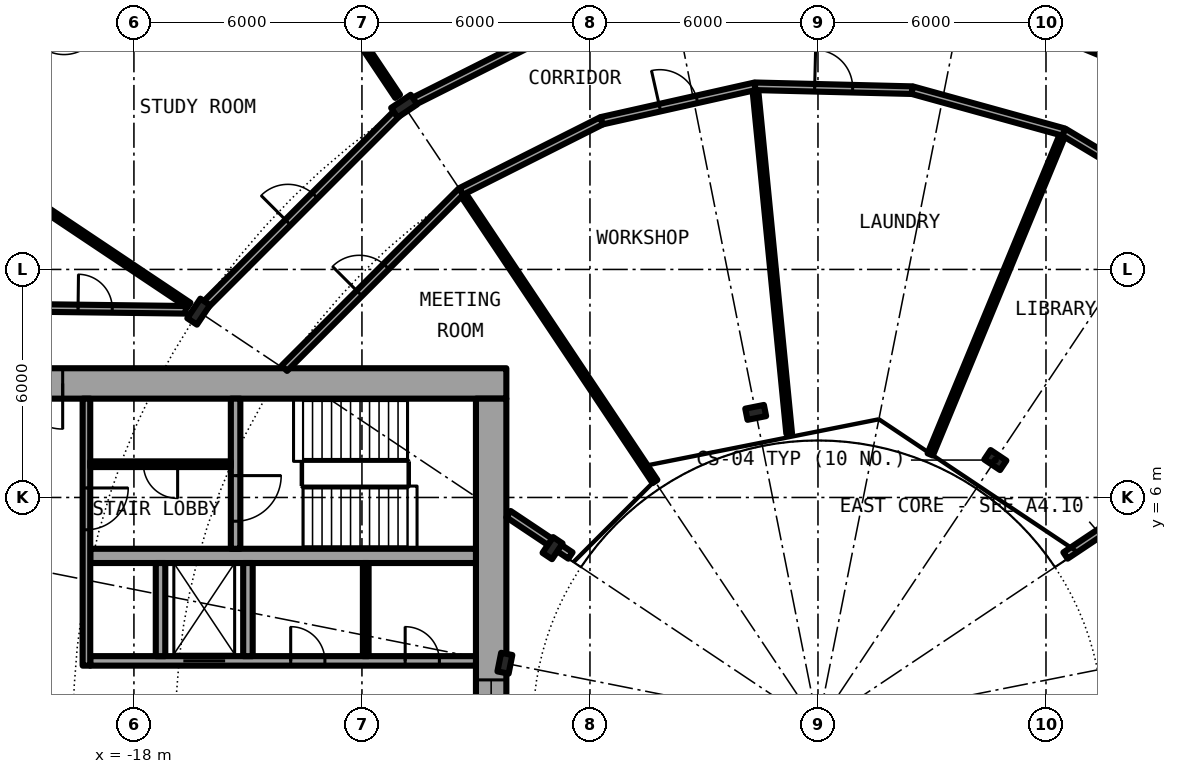
"""IFC4 building model, lengths in metres.
Left out: names, types, materials, properties, quantities, classifications, styles, units other than length and angle.
Written with IfcOpenShell. Run it as: python <this file> out.ifc"""

import sys

from ifc_helpers import new_model, si_unit, direction, frame, frame_2d, origin, origin_2d, place, context, subcontext, project, spatial, rectangle, i_section, extrude, element, fill, save


model = new_model("IFC4")
c1 = context("Model", 3, precision=1e-05, world=origin(), true_north=direction((0.0, 1.0)))
c2 = subcontext(c1, "Body", "Model", "MODEL_VIEW")
j1 = project(units=[si_unit("LENGTHUNIT", "METRE"), si_unit("PLANEANGLEUNIT", "RADIAN")], contexts=[c1])
p1 = place(None, origin())
s1 = spatial("IfcSite", under=j1, at=p1, CompositionType="ELEMENT")
p2 = place(p1, origin())
s2 = spatial("IfcBuilding", under=s1, at=p2, CompositionType="ELEMENT")
p3 = place(p2, frame((0.0, 0.0, 53.3)))
s3 = spatial("IfcBuildingStorey", under=s2, at=p3, CompositionType="ELEMENT", Elevation=53.3)
for number, where, z_axis, x_axis in (
    (1, (-10.889, 16.297, 0.0), (0.0, 0.0, 1.0), (-0.556, 0.831, 0.0)),
    (2, (-16.297, 10.889, 0.0), (0.0, 0.0, 1.0), (-0.831, 0.556, 0.0)),
):
    element("IfcColumn", number, at=place(p3, frame(where, z_axis=z_axis, x_axis=x_axis)), inside=s3, PredefinedType="COLUMN", context=c2, shape_type="SweptSolid", body=[
        extrude(i_section(OverallWidth=0.305, OverallDepth=0.62, WebThickness=0.021, FlangeThickness=0.04, FilletRadius=0.027, at=origin_2d()), origin(), (0.0, 0.0, 1.0), 4.2),
    ])
for number, where, z_axis, x_axis in (
    (3, (4.667, 6.984, 0.0), (0.0, 0.0, 1.0), (0.556, 0.831, 0.0)),
    (4, (-1.639, 8.239, 0.0), (0.0, 0.0, 1.0), (-0.195, 0.981, 0.0)),
    (5, (-6.984, 4.667, 0.0), (0.0, 0.0, 1.0), (-0.831, 0.556, 0.0)),
    (6, (-8.239, 1.639, 0.0), (0.0, 0.0, 1.0), (-0.981, 0.195, 0.0)),
):
    element("IfcColumn", number, at=place(p3, frame(where, z_axis=z_axis, x_axis=x_axis)), inside=s3, PredefinedType="COLUMN", context=c2, shape_type="SweptSolid", body=[
        extrude(i_section(OverallWidth=0.3, OverallDepth=0.5, WebThickness=0.014, FlangeThickness=0.028, FilletRadius=0.027, at=origin_2d()), origin(), (0.0, 0.0, 1.0), 4.2),
    ])
p4 = place(p3, frame((-19.304, 19.304, 0.0), z_axis=(0.0, 0.0, 1.0), x_axis=(-0.634382322723, -0.773019449054, 0.0)))
e7 = element("IfcWall", 7, at=p4, inside=s3, PredefinedType="SOLIDWALL", context=c2, shape_type="SweptSolid", body=[
    extrude(rectangle(XDim=5.352, YDim=0.25, at=frame_2d((2.676, 0.0))), origin(), (0.0, 0.0, 1.0), 3.8),
])
p5 = place(p4, frame((0.841, 0.0, 0.0)))
e8 = element("IfcOpeningElement", 8, at=p5, cuts=e7, PredefinedType="OPENING", context=c2, shape_type="SweptSolid", body=[
    extrude(rectangle(XDim=1.0, YDim=2.2, at=frame_2d((0.5, 1.1))), frame((0.0, 0.135, 0.0), z_axis=(0.0, -1.0, 0.0), x_axis=(1.0, 0.0, 0.0)), (0.0, 0.0, 1.0), 0.27),
])
p6 = place(p4, frame((3.51, 0.0, 0.0)))
e9 = element("IfcOpeningElement", 9, at=p6, cuts=e7, PredefinedType="OPENING", context=c2, shape_type="SweptSolid", body=[
    extrude(rectangle(XDim=1.0, YDim=2.2, at=frame_2d((0.5, 1.1))), frame((0.0, 0.135, 0.0), z_axis=(0.0, -1.0, 0.0), x_axis=(1.0, 0.0, 0.0)), (0.0, 0.0, 1.0), 0.27),
])
p7 = place(p3, frame((-8.2, 9.0, 0.0), z_axis=(0.0, 0.0, 1.0), x_axis=(-1.0, 0.0, 0.0)))
e10 = element("IfcWall", 10, at=p7, inside=s3, PredefinedType="SHEAR", context=c2, shape_type="SweptSolid", body=[
    extrude(rectangle(XDim=14.2, YDim=0.8, at=frame_2d((7.1, 0.0))), origin(), (0.0, 0.0, 1.0), 4.2),
])
p8 = place(p7, frame((11.675, 0.0, 0.0)))
e11 = element("IfcOpeningElement", 11, at=p8, cuts=e10, PredefinedType="OPENING", context=c2, shape_type="SweptSolid", body=[
    extrude(rectangle(XDim=1.2, YDim=2.3, at=frame_2d((0.6, 1.15))), frame((0.0, 0.41, 0.0), z_axis=(0.0, -1.0, 0.0), x_axis=(1.0, 0.0, 0.0)), (0.0, 0.0, 1.0), 0.82),
])
p9 = place(p3, frame((-8.6, 8.6, 0.0), z_axis=(0.0, 0.0, 1.0), x_axis=(0.0, -1.0, 0.0)))
e12 = element("IfcWall", 12, at=p9, inside=s3, PredefinedType="SHEAR", context=c2, shape_type="SweptSolid", body=[
    extrude(rectangle(XDim=17.2, YDim=0.8, at=frame_2d((8.6, 0.0))), origin(), (0.0, 0.0, 1.0), 4.2),
])
p10 = place(p9, frame((7.4, 0.0, 0.1)))
e13 = element("IfcOpeningElement", 13, at=p10, cuts=e12, PredefinedType="OPENING", context=c2, shape_type="SweptSolid", body=[
    extrude(rectangle(XDim=2.4, YDim=2.2, at=frame_2d((1.2, 1.1))), frame((0.0, 0.41, 0.0), z_axis=(0.0, -1.0, 0.0), x_axis=(1.0, 0.0, 0.0)), (0.0, 0.0, 1.0), 0.82),
])
p11 = place(p3, frame((-19.15, 1.7, 0.0), z_axis=(0.0, 0.0, 1.0), x_axis=(1.0, 0.0, 0.0)))
e14 = element("IfcWall", 14, at=p11, inside=s3, PredefinedType="SHEAR", context=c2, shape_type="SweptSolid", body=[
    extrude(rectangle(XDim=10.15, YDim=0.25, at=frame_2d((5.075, 0.0))), origin(), (0.0, 0.0, 1.0), 4.2),
])
p12 = place(p11, frame((2.45, 0.0, 0.0)))
e15 = element("IfcOpeningElement", 15, at=p12, cuts=e14, PredefinedType="OPENING", context=c2, shape_type="SweptSolid", body=[
    extrude(rectangle(XDim=1.1, YDim=2.3, at=frame_2d((0.55, 1.15))), frame((0.0, 0.135, 0.0), z_axis=(0.0, -1.0, 0.0), x_axis=(1.0, 0.0, 0.0)), (0.0, 0.0, 1.0), 0.27),
])
p13 = place(p11, frame((8.288, 0.0, 0.0)))
e16 = element("IfcOpeningElement", 16, at=p13, cuts=e14, PredefinedType="OPENING", context=c2, shape_type="SweptSolid", body=[
    extrude(rectangle(XDim=0.9, YDim=2.3, at=frame_2d((0.45, 1.15))), frame((0.0, 0.135, 0.0), z_axis=(0.0, -1.0, 0.0), x_axis=(1.0, 0.0, 0.0)), (0.0, 0.0, 1.0), 0.27),
])
p14 = place(p11, frame((5.275, 0.0, 0.0)))
e17 = element("IfcOpeningElement", 17, at=p14, cuts=e14, PredefinedType="OPENING", context=c2, shape_type="SweptSolid", body=[
    extrude(rectangle(XDim=0.9, YDim=2.3, at=frame_2d((0.45, 1.15))), frame((0.0, 0.135, 0.0), z_axis=(0.0, -1.0, 0.0), x_axis=(1.0, 0.0, 0.0)), (0.0, 0.0, 1.0), 0.27),
])
p15 = place(p3, frame((-9.0, 4.462, 0.0), z_axis=(0.0, 0.0, 1.0), x_axis=(-1.0, 0.0, 0.0)))
e18 = element("IfcWall", 18, at=p15, inside=s3, PredefinedType="SHEAR", context=c2, shape_type="SweptSolid", body=[
    extrude(rectangle(XDim=10.15, YDim=0.375, at=frame_2d((5.075, 0.0))), origin(), (0.0, 0.0, 1.0), 4.2),
])
p16 = place(p3, frame((-15.325, 8.6, 0.0), z_axis=(0.0, 0.0, 1.0), x_axis=(0.0, -1.0, 0.0)))
e19 = element("IfcWall", 19, at=p16, inside=s3, PredefinedType="SHEAR", context=c2, shape_type="SweptSolid", body=[
    extrude(rectangle(XDim=3.95, YDim=0.25, at=frame_2d((1.975, 0.0))), origin(), (0.0, 0.0, 1.0), 4.2),
])
p17 = place(p16, frame((2.025, 0.0, 0.0)))
e20 = element("IfcOpeningElement", 20, at=p17, cuts=e19, PredefinedType="OPENING", context=c2, shape_type="SweptSolid", body=[
    extrude(rectangle(XDim=1.2, YDim=2.3, at=frame_2d((0.6, 1.15))), frame((0.0, 0.135, 0.0), z_axis=(0.0, -1.0, 0.0), x_axis=(1.0, 0.0, 0.0)), (0.0, 0.0, 1.0), 0.27),
])
for number, where, z_axis, x_axis in (
    (21, (-15.0, 1.825, 0.0), (0.0, 0.0, 1.0), (0.0, 1.0, 0.0)),
    (22, (-17.3, 1.825, 0.0), (0.0, 0.0, 1.0), (0.0, 1.0, 0.0)),
):
    element("IfcWall", number, at=place(p3, frame(where, z_axis=z_axis, x_axis=x_axis)), inside=s3, PredefinedType="SOLIDWALL", context=c2, shape_type="SweptSolid", body=[
        extrude(rectangle(XDim=2.45, YDim=0.25, at=frame_2d((1.225, 0.0))), origin(), (0.0, 0.0, 1.0), 3.8),
    ])
p18 = place(p3, frame((-19.25, 8.6, 0.0), z_axis=(0.0, 0.0, 1.0), x_axis=(0.0, -1.0, 0.0)))
e23 = element("IfcWall", 23, at=p18, inside=s3, PredefinedType="SOLIDWALL", context=c2, shape_type="SweptSolid", body=[
    extrude(rectangle(XDim=7.025, YDim=0.2, at=frame_2d((3.513, 0.0))), origin(), (0.0, 0.0, 1.0), 3.8),
])
p19 = place(p18, frame((2.35, 0.0, 0.0)))
e24 = element("IfcOpeningElement", 24, at=p19, cuts=e23, PredefinedType="OPENING", context=c2, shape_type="SweptSolid", body=[
    extrude(rectangle(XDim=1.1, YDim=2.3, at=frame_2d((0.55, 1.15))), frame((0.0, 0.11, 0.0), z_axis=(0.0, -1.0, 0.0), x_axis=(1.0, 0.0, 0.0)), (0.0, 0.0, 1.0), 0.22),
])
p20 = place(p3, frame((-11.9, 1.825, 0.0), z_axis=(0.0, 0.0, 1.0), x_axis=(0.0, 1.0, 0.0)))
e25 = element("IfcWall", 25, at=p20, inside=s3, PredefinedType="PARTITIONING", context=c2, shape_type="SweptSolid", body=[
    extrude(rectangle(XDim=2.45, YDim=0.15, at=frame_2d((1.225, 0.0))), origin(), (0.0, 0.0, 1.0), 3.8),
])
p21 = place(p3, frame((-15.45, 6.875, 0.0), z_axis=(0.0, 0.0, 1.0), x_axis=(-1.0, 0.0, 0.0)))
e26 = element("IfcWall", 26, at=p21, inside=s3, PredefinedType="PARTITIONING", context=c2, shape_type="SweptSolid", body=[
    extrude(rectangle(XDim=3.7, YDim=0.15, at=frame_2d((1.85, 0.0))), origin(), (0.0, 0.0, 1.0), 3.8),
])
p22 = place(p21, frame((1.4, 0.0, 0.0)))
e27 = element("IfcOpeningElement", 27, at=p22, cuts=e26, PredefinedType="OPENING", context=c2, shape_type="SweptSolid", body=[
    extrude(rectangle(XDim=0.9, YDim=2.3, at=frame_2d((0.45, 1.15))), frame((0.0, 0.085, 0.0), z_axis=(0.0, -1.0, 0.0), x_axis=(1.0, 0.0, 0.0)), (0.0, 0.0, 1.0), 0.17),
])
p23 = place(p3, frame((-22.595, 15.098, 0.0), z_axis=(0.0, 0.0, 1.0), x_axis=(0.831403467378, -0.55566921314, 0.0)))
e28 = element("IfcWall", 28, at=p23, inside=s3, PredefinedType="PARTITIONING", context=c2, shape_type="SweptSolid", body=[
    extrude(rectangle(XDim=7.265, YDim=0.15, at=frame_2d((3.632, 0.0))), origin(), (0.0, 0.0, 1.0), 3.8),
])
p24 = place(p3, frame((-15.097, 22.595, 0.0), z_axis=(0.0, 0.0, 1.0), x_axis=(0.555576285599, -0.831465568067, 0.0)))
e29 = element("IfcWall", 29, at=p24, inside=s3, PredefinedType="PARTITIONING", context=c2, shape_type="SweptSolid", body=[
    extrude(rectangle(XDim=7.264, YDim=0.15, at=frame_2d((3.632, 0.0))), origin(), (0.0, 0.0, 1.0), 3.8),
])
p25 = place(p3, frame((-9.389, 14.052, 0.0), z_axis=(0.0, 0.0, 1.0), x_axis=(0.555540720778, -0.831489330994, 0.0)))
e30 = element("IfcWall", 30, at=p25, inside=s3, PredefinedType="PARTITIONING", context=c2, shape_type="SweptSolid", body=[
    extrude(rectangle(XDim=9.18, YDim=0.15, at=frame_2d((4.59, 0.0))), origin(), (0.0, 0.0, 1.0), 3.8),
])
p26 = place(p3, frame((-1.657, 16.819, 0.0), z_axis=(0.0, 0.0, 1.0), x_axis=(0.097921086551, -0.995194182463, 0.0)))
e31 = element("IfcWall", 31, at=p26, inside=s3, PredefinedType="PARTITIONING", context=c2, shape_type="SweptSolid", body=[
    extrude(rectangle(XDim=9.18, YDim=0.15, at=frame_2d((4.59, 0.0))), origin(), (0.0, 0.0, 1.0), 3.8),
])
p27 = place(p3, frame((2.954, 7.132, 0.0), z_axis=(0.0, 0.0, 1.0), x_axis=(0.382646942224, 0.923894646378, 0.0)))
e32 = element("IfcWall", 32, at=p27, inside=s3, PredefinedType="PARTITIONING", context=c2, shape_type="SweptSolid", body=[
    extrude(rectangle(XDim=9.181, YDim=0.15, at=frame_2d((4.59, 0.0))), origin(), (0.0, 0.0, 1.0), 3.8),
])
for number, where, z_axis, x_axis in (
    (33, (-6.513, 4.472, 0.0), (0.0, 0.0, 1.0), (-0.831, 0.556, 0.0)),
    (34, (6.513, 4.472, 0.0), (0.0, 0.0, 1.0), (0.831, 0.556, 0.0)),
):
    element("IfcWall", number, at=place(p3, frame(where, z_axis=z_axis, x_axis=x_axis)), inside=s3, PredefinedType="PARTITIONING", context=c2, shape_type="SweptSolid", body=[
        extrude(rectangle(XDim=1.962, YDim=0.2, at=frame_2d((0.981, 0.0))), origin(), (0.0, 0.0, 1.0), 3.8),
    ])
p28 = place(p3, frame((-21.675, 11.0, 0.0), z_axis=(0.0, 0.0, 1.0), x_axis=(0.99992425795, -0.012307654658, 0.0)))
e35 = element("IfcWall", 35, at=p28, inside=s3, PredefinedType="PARTITIONING", context=c2, shape_type="SweptSolid", body=[
    extrude(rectangle(XDim=5.039, YDim=0.2, at=frame_2d((2.519, 0.0))), origin(), (0.0, 0.0, 1.0), 3.8),
])
p29 = place(p28, frame((2.205, 0.0, 0.0)))
e36 = element("IfcOpeningElement", 36, at=p29, cuts=e35, PredefinedType="OPENING", context=c2, shape_type="SweptSolid", body=[
    extrude(rectangle(XDim=0.9, YDim=2.3, at=frame_2d((0.45, 1.15))), frame((0.0, 0.11, 0.0), z_axis=(0.0, -1.0, 0.0), x_axis=(1.0, 0.0, 0.0)), (0.0, 0.0, 1.0), 0.22),
])
p30 = place(p3, frame((-14.041, 9.4, 0.0), z_axis=(0.0, 0.0, 1.0), x_axis=(0.707106781187, 0.707106781187, 0.0)))
e37 = element("IfcWall", 37, at=p30, inside=s3, PredefinedType="PARTITIONING", context=c2, shape_type="SweptSolid", body=[
    extrude(rectangle(XDim=6.579, YDim=0.2, at=frame_2d((3.29, 0.0))), origin(), (0.0, 0.0, 1.0), 3.8),
])
p31 = place(p30, frame((2.789, 0.0, 0.0)))
e38 = element("IfcOpeningElement", 38, at=p31, cuts=e37, PredefinedType="OPENING", context=c2, shape_type="SweptSolid", body=[
    extrude(rectangle(XDim=1.0, YDim=2.3, at=frame_2d((0.5, 1.15))), frame((0.0, 0.11, 0.0), z_axis=(0.0, -1.0, 0.0), x_axis=(1.0, 0.0, 0.0)), (0.0, 0.0, 1.0), 0.22),
])
p32 = place(p3, frame((6.467, 15.614, 0.0), z_axis=(0.0, 0.0, 1.0), x_axis=(0.857696997328, -0.514155483074, 0.0)))
e39 = element("IfcWall", 39, at=p32, inside=s3, PredefinedType="PARTITIONING", context=c2, shape_type="SweptSolid", body=[
    extrude(rectangle(XDim=4.96, YDim=0.2, at=frame_2d((2.48, 0.0))), origin(), (0.0, 0.0, 1.0), 3.8),
])
p33 = place(p32, frame((1.98, 0.0, 0.0)))
e40 = element("IfcOpeningElement", 40, at=p33, cuts=e39, PredefinedType="OPENING", context=c2, shape_type="SweptSolid", body=[
    extrude(rectangle(XDim=1.0, YDim=2.3, at=frame_2d((0.5, 1.15))), frame((0.0, 0.11, 0.0), z_axis=(0.0, -1.0, 0.0), x_axis=(1.0, 0.0, 0.0)), (0.0, 0.0, 1.0), 0.22),
])
p34 = place(p3, frame((-9.389, 14.052, 0.0), z_axis=(0.0, 0.0, 1.0), x_axis=(0.893243942099, 0.449572307759, 0.0)))
e41 = element("IfcWall", 41, at=p34, inside=s3, PredefinedType="PARTITIONING", context=c2, shape_type="SweptSolid", body=[
    extrude(rectangle(XDim=4.137, YDim=0.2, at=frame_2d((2.069, 0.0))), origin(), (0.0, 0.0, 1.0), 3.8),
])
p35 = place(p3, frame((-5.693, 15.912, 0.0), z_axis=(0.0, 0.0, 1.0), x_axis=(0.975680467384, 0.219197686039, 0.0)))
e42 = element("IfcWall", 42, at=p35, inside=s3, PredefinedType="PARTITIONING", context=c2, shape_type="SweptSolid", body=[
    extrude(rectangle(XDim=4.138, YDim=0.2, at=frame_2d((2.069, 0.0))), origin(), (0.0, 0.0, 1.0), 3.8),
])
p36 = place(p35, frame((1.569, 0.0, 0.0)))
e43 = element("IfcOpeningElement", 43, at=p36, cuts=e42, PredefinedType="OPENING", context=c2, shape_type="SweptSolid", body=[
    extrude(rectangle(XDim=1.0, YDim=2.3, at=frame_2d((0.5, 1.15))), frame((0.0, 0.11, 0.0), z_axis=(0.0, -1.0, 0.0), x_axis=(1.0, 0.0, 0.0)), (0.0, 0.0, 1.0), 0.22),
])
p37 = place(p3, frame((-1.656, 16.819, 0.0), z_axis=(0.0, 0.0, 1.0), x_axis=(0.999695739034, -0.024666360836, 0.0)))
e44 = element("IfcWall", 44, at=p37, inside=s3, PredefinedType="PARTITIONING", context=c2, shape_type="SweptSolid", body=[
    extrude(rectangle(XDim=4.137, YDim=0.2, at=frame_2d((2.069, 0.0))), origin(), (0.0, 0.0, 1.0), 3.8),
])
p38 = place(p37, frame((1.569, 0.0, 0.0)))
e45 = element("IfcOpeningElement", 45, at=p38, cuts=e44, PredefinedType="OPENING", context=c2, shape_type="SweptSolid", body=[
    extrude(rectangle(XDim=1.0, YDim=2.3, at=frame_2d((0.5, 1.15))), frame((0.0, 0.11, 0.0), z_axis=(0.0, -1.0, 0.0), x_axis=(1.0, 0.0, 0.0)), (0.0, 0.0, 1.0), 0.22),
])
p39 = place(p3, frame((2.48, 16.717, 0.0), z_axis=(0.0, 0.0, 1.0), x_axis=(0.96379724587, -0.266636210694, 0.0)))
e46 = element("IfcWall", 46, at=p39, inside=s3, PredefinedType="PARTITIONING", context=c2, shape_type="SweptSolid", body=[
    extrude(rectangle(XDim=4.137, YDim=0.2, at=frame_2d((2.068, 0.0))), origin(), (0.0, 0.0, 1.0), 3.8),
])
p40 = place(p3, frame((-16.187, 10.999, 0.0), z_axis=(0.0, 0.0, 1.0), x_axis=(0.707106781187, 0.707106781187, 0.0)))
e47 = element("IfcWall", 47, at=p40, inside=s3, PredefinedType="PARTITIONING", context=c2, shape_type="SweptSolid", body=[
    extrude(rectangle(XDim=7.337, YDim=0.2, at=frame_2d((3.668, 0.0))), origin(), (0.0, 0.0, 1.0), 3.48),
])
p41 = place(p40, frame((3.168, 0.0, 0.0)))
e48 = element("IfcOpeningElement", 48, at=p41, cuts=e47, PredefinedType="OPENING", context=c2, shape_type="SweptSolid", body=[
    extrude(rectangle(XDim=1.0, YDim=2.3, at=frame_2d((0.5, 1.15))), frame((0.0, 0.11, 0.0), z_axis=(0.0, -1.0, 0.0), x_axis=(1.0, 0.0, 0.0)), (0.0, 0.0, 1.0), 0.22),
])
p42 = place(p3, frame((3.967, 19.164, 0.0), z_axis=(0.0, 0.0, 1.0), x_axis=(0.923873274019, -0.382698541353, 0.0)))
e49 = element("IfcWall", 49, at=p42, inside=s3, PredefinedType="PARTITIONING", context=c2, shape_type="SweptSolid", body=[
    extrude(rectangle(XDim=7.338, YDim=0.2, at=frame_2d((3.669, 0.0))), origin(), (0.0, 0.0, 1.0), 3.48),
])
p43 = place(p3, frame((-10.752, 16.366, 0.0), z_axis=(0.0, 0.0, 1.0), x_axis=(0.893246691773, 0.449566844459, 0.0)))
e50 = element("IfcWall", 50, at=p43, inside=s3, PredefinedType="PARTITIONING", context=c2, shape_type="SweptSolid", body=[
    extrude(rectangle(XDim=4.645, YDim=0.2, at=frame_2d((2.322, 0.0))), origin(), (0.0, 0.0, 1.0), 3.48),
])
p44 = place(p12, origin())
e51 = element("IfcDoor", 51, at=p44, inside=s3, OperationType="DOUBLE_DOOR_SLIDING", PredefinedType="DOOR", context=c2, shape_type="SweptSolid", body=[
    extrude(rectangle(XDim=1.1, YDim=2.3, at=frame_2d((0.55, 1.15))), frame((0.0, 0.025, 0.0), z_axis=(0.0, -1.0, 0.0), x_axis=(1.0, 0.0, 0.0)), (0.0, 0.0, 1.0), 0.05),
])
fill(e15, e51)
p45 = place(p13, origin())
e52 = element("IfcDoor", 52, at=p45, inside=s3, OperationType="SINGLE_SWING_LEFT", PredefinedType="DOOR", context=c2, shape_type="SweptSolid", body=[
    extrude(rectangle(XDim=0.9, YDim=2.3, at=frame_2d((0.45, 1.15))), frame((0.0, 0.025, 0.0), z_axis=(0.0, -1.0, 0.0), x_axis=(1.0, 0.0, 0.0)), (0.0, 0.0, 1.0), 0.05),
])
fill(e16, e52)
p46 = place(p14, origin())
e53 = element("IfcDoor", 53, at=p46, inside=s3, OperationType="SINGLE_SWING_LEFT", PredefinedType="DOOR", context=c2, shape_type="SweptSolid", body=[
    extrude(rectangle(XDim=0.9, YDim=2.3, at=frame_2d((0.45, 1.15))), frame((0.0, 0.025, 0.0), z_axis=(0.0, -1.0, 0.0), x_axis=(1.0, 0.0, 0.0)), (0.0, 0.0, 1.0), 0.05),
])
fill(e17, e53)
p47 = place(p22, origin())
e54 = element("IfcDoor", 54, at=p47, inside=s3, OperationType="SINGLE_SWING_LEFT", PredefinedType="DOOR", context=c2, shape_type="SweptSolid", body=[
    extrude(rectangle(XDim=0.9, YDim=2.3, at=frame_2d((0.45, 1.15))), frame((0.0, 0.025, 0.0), z_axis=(0.0, -1.0, 0.0), x_axis=(1.0, 0.0, 0.0)), (0.0, 0.0, 1.0), 0.05),
])
fill(e27, e54)
p48 = place(p17, origin())
e55 = element("IfcDoor", 55, at=p48, inside=s3, OperationType="SINGLE_SWING_LEFT", PredefinedType="DOOR", context=c2, shape_type="SweptSolid", body=[
    extrude(rectangle(XDim=1.2, YDim=2.3, at=frame_2d((0.6, 1.15))), frame((0.0, 0.025, 0.0), z_axis=(0.0, -1.0, 0.0), x_axis=(1.0, 0.0, 0.0)), (0.0, 0.0, 1.0), 0.05),
])
fill(e20, e55)
p49 = place(p19, origin())
e56 = element("IfcDoor", 56, at=p49, inside=s3, OperationType="SINGLE_SWING_RIGHT", PredefinedType="DOOR", context=c2, shape_type="SweptSolid", body=[
    extrude(rectangle(XDim=1.1, YDim=2.3, at=frame_2d((0.55, 1.15))), frame((0.0, 0.025, 0.0), z_axis=(0.0, -1.0, 0.0), x_axis=(1.0, 0.0, 0.0)), (0.0, 0.0, 1.0), 0.05),
])
fill(e24, e56)
p50 = place(p8, origin())
e57 = element("IfcDoor", 57, at=p50, inside=s3, OperationType="SINGLE_SWING_LEFT", PredefinedType="DOOR", context=c2, shape_type="SweptSolid", body=[
    extrude(rectangle(XDim=1.2, YDim=2.3, at=frame_2d((0.6, 1.15))), frame((0.0, 0.025, 0.0), z_axis=(0.0, -1.0, 0.0), x_axis=(1.0, 0.0, 0.0)), (0.0, 0.0, 1.0), 0.05),
])
fill(e11, e57)
p51 = place(p10, origin())
e58 = element("IfcWindow", 58, at=p51, inside=s3, PartitioningType="SINGLE_PANEL", PredefinedType="WINDOW", context=c2, shape_type="SweptSolid", body=[
    extrude(rectangle(XDim=2.4, YDim=2.2, at=frame_2d((1.2, 1.1))), frame((0.0, 0.03, 0.0), z_axis=(0.0, -1.0, 0.0), x_axis=(1.0, 0.0, 0.0)), (0.0, 0.0, 1.0), 0.06),
])
fill(e13, e58)
p52 = place(p41, origin())
e59 = element("IfcDoor", 59, at=p52, inside=s3, OperationType="SINGLE_SWING_RIGHT", PredefinedType="DOOR", context=c2, shape_type="SweptSolid", body=[
    extrude(rectangle(XDim=1.0, YDim=2.3, at=frame_2d((0.5, 1.15))), frame((0.0, 0.025, 0.0), z_axis=(0.0, -1.0, 0.0), x_axis=(1.0, 0.0, 0.0)), (0.0, 0.0, 1.0), 0.05),
])
fill(e48, e59)
p53 = place(p38, origin())
e60 = element("IfcDoor", 60, at=p53, inside=s3, OperationType="SINGLE_SWING_LEFT", PredefinedType="DOOR", context=c2, shape_type="SweptSolid", body=[
    extrude(rectangle(XDim=1.0, YDim=2.3, at=frame_2d((0.5, 1.15))), frame((0.0, 0.025, 0.0), z_axis=(0.0, -1.0, 0.0), x_axis=(1.0, 0.0, 0.0)), (0.0, 0.0, 1.0), 0.05),
])
fill(e45, e60)
p54 = place(p36, origin())
e61 = element("IfcDoor", 61, at=p54, inside=s3, OperationType="SINGLE_SWING_RIGHT", PredefinedType="DOOR", context=c2, shape_type="SweptSolid", body=[
    extrude(rectangle(XDim=1.0, YDim=2.3, at=frame_2d((0.5, 1.15))), frame((0.0, 0.025, 0.0), z_axis=(0.0, -1.0, 0.0), x_axis=(1.0, 0.0, 0.0)), (0.0, 0.0, 1.0), 0.05),
])
fill(e43, e61)
p55 = place(p31, origin())
e62 = element("IfcDoor", 62, at=p55, inside=s3, OperationType="SINGLE_SWING_RIGHT", PredefinedType="DOOR", context=c2, shape_type="SweptSolid", body=[
    extrude(rectangle(XDim=1.0, YDim=2.3, at=frame_2d((0.5, 1.15))), frame((0.0, 0.025, 0.0), z_axis=(0.0, -1.0, 0.0), x_axis=(1.0, 0.0, 0.0)), (0.0, 0.0, 1.0), 0.05),
])
fill(e38, e62)
p56 = place(p29, origin())
e63 = element("IfcDoor", 63, at=p56, inside=s3, OperationType="SINGLE_SWING_RIGHT", PredefinedType="DOOR", context=c2, shape_type="SweptSolid", body=[
    extrude(rectangle(XDim=0.9, YDim=2.3, at=frame_2d((0.45, 1.15))), frame((0.0, 0.025, 0.0), z_axis=(0.0, -1.0, 0.0), x_axis=(1.0, 0.0, 0.0)), (0.0, 0.0, 1.0), 0.05),
])
fill(e36, e63)
save(model, sys.argv[1])
